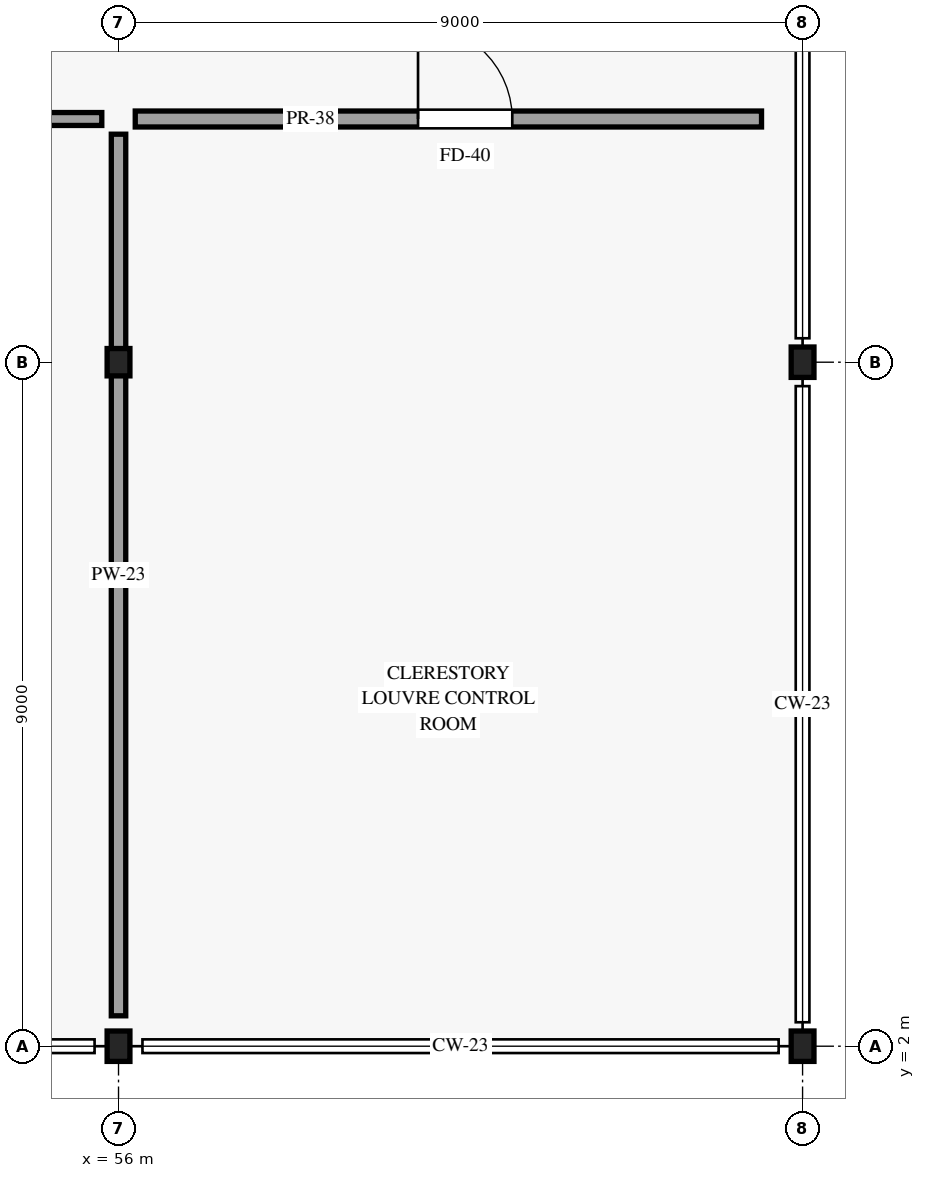
"""IFC4 building model, lengths in metres.
Left out: names, types, materials, properties, quantities, classifications, styles, units other than length and angle.
Written with IfcOpenShell. Run it as: python <this file> out.ifc"""

import sys

from ifc_helpers import new_model, si_unit, direction, frame, frame_2d, origin, origin_2d, place, context, subcontext, project, spatial, rectangle, i_section, extrude, element, fill, save


model = new_model("IFC4")
c1 = context("Model", 3, precision=1e-05, world=origin(), true_north=direction((0.0, 1.0)))
c2 = subcontext(c1, "Body", "Model", "MODEL_VIEW")
j1 = project(units=[si_unit("LENGTHUNIT", "METRE"), si_unit("PLANEANGLEUNIT", "RADIAN")], contexts=[c1])
p1 = place(None, origin())
s1 = spatial("IfcSite", under=j1, at=p1, CompositionType="ELEMENT")
p2 = place(p1, origin())
s2 = spatial("IfcBuilding", under=s1, at=p2, CompositionType="ELEMENT")
p3 = place(p2, frame((0.0, 0.0, 24.0)))
s3 = spatial("IfcBuildingStorey", under=s2, at=p3, CompositionType="ELEMENT", Elevation=24.0)
p4 = place(p3, frame((56.0, 2.0, 0.0), z_axis=(0.0, 0.0, 1.0), x_axis=(1.0, 0.0, 0.0)))
e1 = element("IfcColumn", 1, at=p4, inside=s3, PredefinedType="COLUMN", context=c2, shape_type="SweptSolid", body=[
    extrude(i_section(OverallWidth=0.3, OverallDepth=0.4, WebThickness=0.013, FlangeThickness=0.024, FilletRadius=0.027, at=origin_2d()), origin(), (0.0, 0.0, 1.0), 4.8),
])
p5 = place(p3, frame((56.0, 11.0, 0.0), z_axis=(0.0, 0.0, 1.0), x_axis=(1.0, 0.0, 0.0)))
e2 = element("IfcColumn", 2, at=p5, inside=s3, PredefinedType="COLUMN", context=c2, shape_type="SweptSolid", body=[
    extrude(i_section(OverallWidth=0.3, OverallDepth=0.36, WebThickness=0.012, FlangeThickness=0.022, FilletRadius=0.027, at=origin_2d()), origin(), (0.0, 0.0, 1.0), 4.8),
])
for number, where, z_axis, x_axis in (
    (3, (65.0, 2.0, 0.0), (0.0, 0.0, 1.0), (1.0, 0.0, 0.0)),
    (4, (65.0, 11.0, 0.0), (0.0, 0.0, 1.0), (1.0, 0.0, 0.0)),
):
    element("IfcColumn", number, at=place(p3, frame(where, z_axis=z_axis, x_axis=x_axis)), inside=s3, PredefinedType="COLUMN", context=c2, shape_type="SweptSolid", body=[
        extrude(i_section(OverallWidth=0.3, OverallDepth=0.4, WebThickness=0.013, FlangeThickness=0.024, FilletRadius=0.027, at=origin_2d()), origin(), (0.0, 0.0, 1.0), 4.8),
    ])
p6 = place(p3, frame((43.82, 14.2, 0.0), z_axis=(0.0, 0.0, 1.0), x_axis=(1.0, 0.0, 0.0)))
e5 = element("IfcWall", 5, at=p6, inside=s3, PredefinedType="PARTITIONING", context=c2, shape_type="SweptSolid", body=[
    extrude(rectangle(XDim=11.96, YDim=0.17, at=frame_2d((5.98, 0.0))), origin(), (0.0, 0.0, 1.0), 2.665),
])
p7 = place(p6, frame((7.207, 0.0, 0.0)))
e6 = element("IfcOpeningElement", 6, at=p7, cuts=e5, PredefinedType="OPENING", context=c2, shape_type="SweptSolid", body=[
    extrude(rectangle(XDim=1.16, YDim=2.28, at=frame_2d((0.58, 1.14))), frame((0.0, 0.095, 0.0), z_axis=(0.0, -1.0, 0.0), x_axis=(1.0, 0.0, 0.0)), (0.0, 0.0, 1.0), 0.19),
])
p8 = place(p3, frame((56.0, 2.4, 0.0), z_axis=(0.0, 0.0, 1.0), x_axis=(0.0, 1.0, 0.0)))
e7 = element("IfcWall", 7, at=p8, inside=s3, PredefinedType="PARTITIONING", context=c2, shape_type="SweptSolid", body=[
    extrude(rectangle(XDim=11.6, YDim=0.19, at=frame_2d((5.8, 0.0))), origin(), (0.0, 0.0, 1.0), 2.665),
])
p9 = place(p3, frame((56.22, 14.2, 0.0), z_axis=(0.0, 0.0, 1.0), x_axis=(1.0, 0.0, 0.0)))
e8 = element("IfcWall", 8, at=p9, inside=s3, PredefinedType="PARTITIONING", context=c2, shape_type="SweptSolid", body=[
    extrude(rectangle(XDim=8.24, YDim=0.21, at=frame_2d((4.12, 0.0))), origin(), (0.0, 0.0, 1.0), 2.665),
])
p10 = place(p9, frame((3.721, 0.0, 0.0)))
e9 = element("IfcOpeningElement", 9, at=p10, cuts=e8, PredefinedType="OPENING", context=c2, shape_type="SweptSolid", body=[
    extrude(rectangle(XDim=1.24, YDim=2.32, at=frame_2d((0.62, 1.16))), frame((0.0, 0.115, 0.0), z_axis=(0.0, -1.0, 0.0), x_axis=(1.0, 0.0, 0.0)), (0.0, 0.0, 1.0), 0.23),
])
p11 = place(p10, origin())
e10 = element("IfcDoor", 10, at=p11, inside=s3, OperationType="SINGLE_SWING_LEFT", PredefinedType="DOOR", context=c2, shape_type="SweptSolid", body=[
    extrude(rectangle(XDim=1.24, YDim=2.32, at=frame_2d((0.62, 1.16))), frame((0.0, 0.025, 0.0), z_axis=(0.0, -1.0, 0.0), x_axis=(1.0, 0.0, 0.0)), (0.0, 0.0, 1.0), 0.05),
])
fill(e9, e10)
save(model, sys.argv[1])
